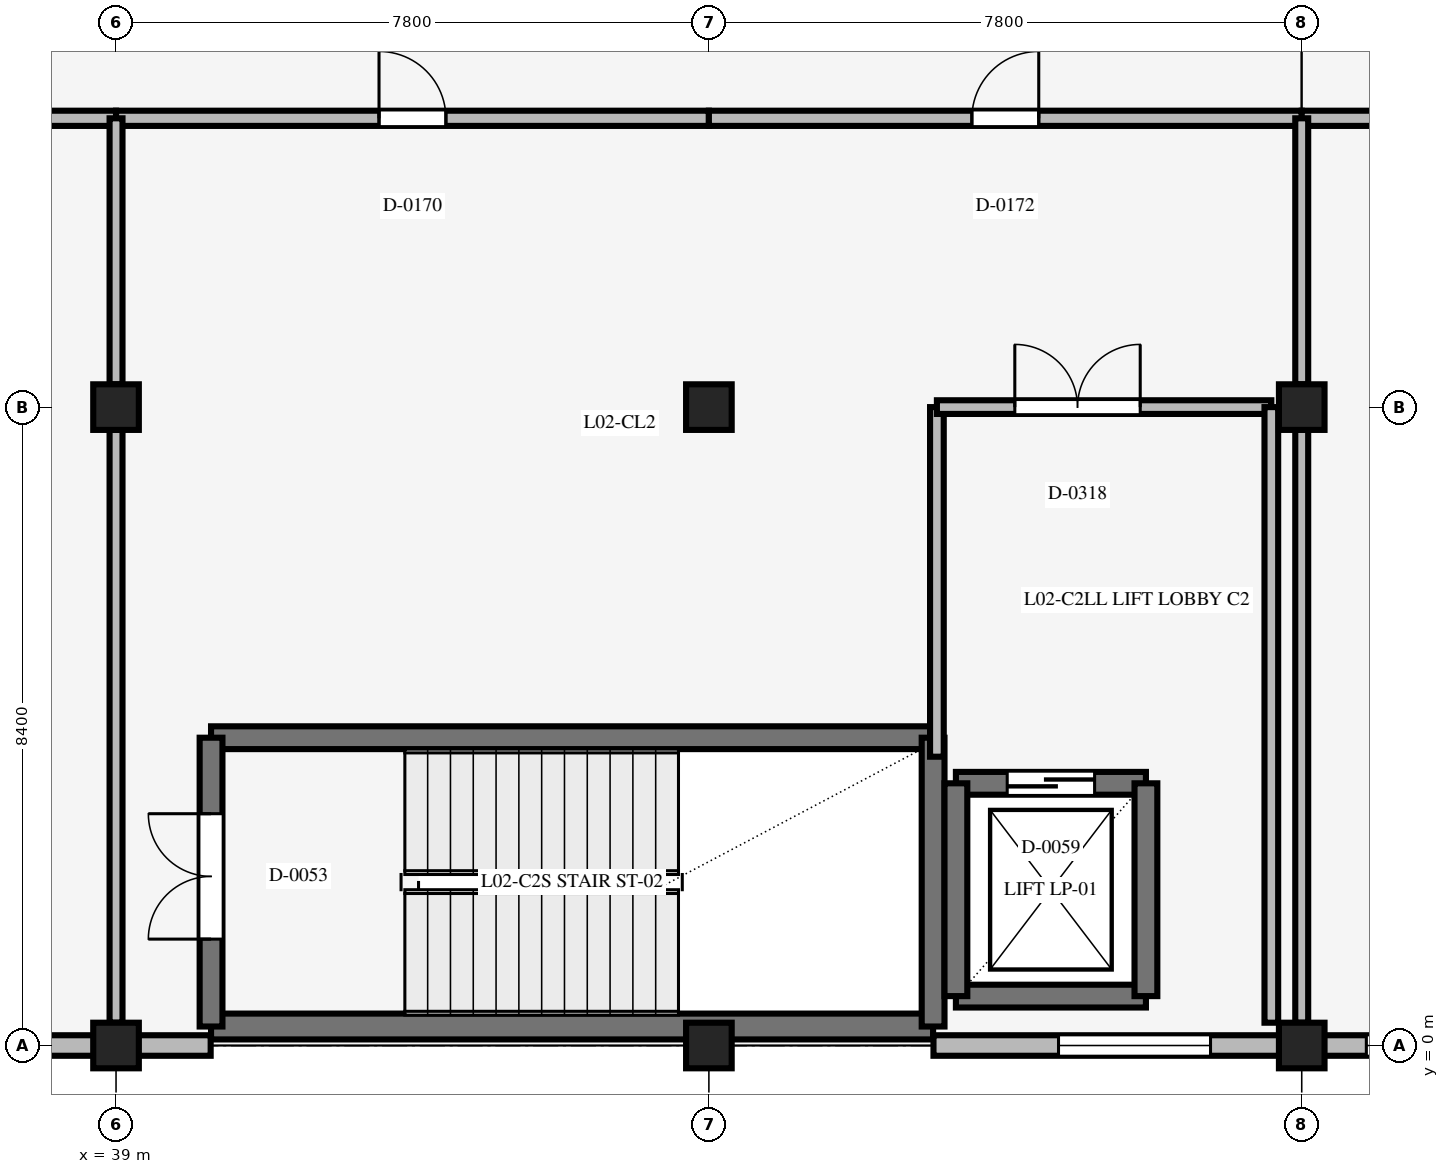
"""IFC4 building model, lengths in metres.
Left out: names, types, materials, properties, quantities, classifications, styles, units other than length and angle.
Written with IfcOpenShell. Run it as: python <this file> out.ifc"""

import sys

from ifc_helpers import new_model, si_unit, direction, frame, frame_2d, origin, origin_2d, place, context, subcontext, project, spatial, rectangle, extrude, element, fill, save


model = new_model("IFC4")
c1 = context("Model", 3, precision=1e-05, world=origin(), true_north=direction((0.0, 1.0)))
c2 = subcontext(c1, "Body", "Model", "MODEL_VIEW")
j1 = project(units=[si_unit("LENGTHUNIT", "METRE"), si_unit("PLANEANGLEUNIT", "RADIAN")], contexts=[c1])
p1 = place(None, origin())
s1 = spatial("IfcSite", under=j1, at=p1, CompositionType="ELEMENT")
p2 = place(p1, origin())
s2 = spatial("IfcBuilding", under=s1, at=p2, CompositionType="ELEMENT")
p3 = place(p2, frame((0.0, 0.0, 12.0)))
s3 = spatial("IfcBuildingStorey", under=s2, at=p3, CompositionType="ELEMENT", Elevation=12.0)
for number, where, z_axis, x_axis in (
    (1, (39.0, 0.0, 0.0), (0.0, 0.0, 1.0), (1.0, 0.0, 0.0)),
    (2, (39.0, 8.4, 0.0), (0.0, 0.0, 1.0), (1.0, 0.0, 0.0)),
    (3, (46.8, 0.0, 0.0), (0.0, 0.0, 1.0), (1.0, 0.0, 0.0)),
    (4, (46.8, 8.4, 0.0), (0.0, 0.0, 1.0), (1.0, 0.0, 0.0)),
    (5, (54.6, 0.0, 0.0), (0.0, 0.0, 1.0), (1.0, 0.0, 0.0)),
    (6, (54.6, 8.4, 0.0), (0.0, 0.0, 1.0), (1.0, 0.0, 0.0)),
):
    element("IfcColumn", number, at=place(p3, frame(where, z_axis=z_axis, x_axis=x_axis)), inside=s3, PredefinedType="COLUMN", context=c2, shape_type="SweptSolid", body=[
        extrude(rectangle(XDim=0.6, YDim=0.6, at=origin_2d()), origin(), (0.0, 0.0, 1.0), 3.9),
    ])
p4 = place(p3, frame((49.75, 0.25, 0.0), z_axis=(0.0, 0.0, 1.0), x_axis=(-1.0, 0.0, 0.0)))
e7 = element("IfcWall", 7, at=p4, inside=s3, PredefinedType="STANDARD", context=c2, shape_type="SweptSolid", body=[
    extrude(rectangle(XDim=9.5, YDim=0.34, at=frame_2d((4.75, 0.0))), origin(), (0.0, 0.0, 1.0), 3.9),
])
p5 = place(p3, frame((40.25, 4.05, 0.0), z_axis=(0.0, 0.0, 1.0), x_axis=(1.0, 0.0, 0.0)))
e8 = element("IfcWall", 8, at=p5, inside=s3, PredefinedType="SHEAR", context=c2, shape_type="SweptSolid", body=[
    extrude(rectangle(XDim=9.5, YDim=0.3, at=frame_2d((4.75, 0.0))), origin(), (0.0, 0.0, 1.0), 3.9),
])
p6 = place(p3, frame((40.25, 0.25, 0.0), z_axis=(0.0, 0.0, 1.0), x_axis=(0.0, 1.0, 0.0)))
e9 = element("IfcWall", 9, at=p6, inside=s3, PredefinedType="SHEAR", context=c2, shape_type="SweptSolid", body=[
    extrude(rectangle(XDim=3.8, YDim=0.3, at=frame_2d((1.9, 0.0))), origin(), (0.0, 0.0, 1.0), 3.9),
])
p7 = place(p6, frame((1.15, 0.0, 0.0)))
e10 = element("IfcOpeningElement", 10, at=p7, cuts=e9, PredefinedType="OPENING", context=c2, shape_type="SweptSolid", body=[
    extrude(rectangle(XDim=1.65, YDim=2.2, at=frame_2d((0.825, 1.1))), frame((0.0, 0.16, 0.0), z_axis=(0.0, -1.0, 0.0), x_axis=(1.0, 0.0, 0.0)), (0.0, 0.0, 1.0), 0.32),
])
p8 = place(p3, frame((49.75, 0.25, 0.0), z_axis=(0.0, 0.0, 1.0), x_axis=(0.0, 1.0, 0.0)))
e11 = element("IfcWall", 11, at=p8, inside=s3, PredefinedType="SHEAR", context=c2, shape_type="SweptSolid", body=[
    extrude(rectangle(XDim=3.8, YDim=0.3, at=frame_2d((1.9, 0.0))), origin(), (0.0, 0.0, 1.0), 3.9),
])
p9 = place(p3, frame((50.05, 0.65, 0.0), z_axis=(0.0, 0.0, 1.0), x_axis=(1.0, 0.0, 0.0)))
e12 = element("IfcWall", 12, at=p9, inside=s3, PredefinedType="SHEAR", context=c2, shape_type="SweptSolid", body=[
    extrude(rectangle(XDim=2.5, YDim=0.3, at=frame_2d((1.25, 0.0))), origin(), (0.0, 0.0, 1.0), 3.64),
])
p10 = place(p3, frame((50.05, 3.45, 0.0), z_axis=(0.0, 0.0, 1.0), x_axis=(1.0, 0.0, 0.0)))
e13 = element("IfcWall", 13, at=p10, inside=s3, PredefinedType="SHEAR", context=c2, shape_type="SweptSolid", body=[
    extrude(rectangle(XDim=2.5, YDim=0.3, at=frame_2d((1.25, 0.0))), origin(), (0.0, 0.0, 1.0), 3.64),
])
p11 = place(p10, frame((0.675, 0.0, 0.0)))
e14 = element("IfcOpeningElement", 14, at=p11, cuts=e13, PredefinedType="OPENING", context=c2, shape_type="SweptSolid", body=[
    extrude(rectangle(XDim=1.15, YDim=2.2, at=frame_2d((0.575, 1.1))), frame((0.0, 0.16, 0.0), z_axis=(0.0, -1.0, 0.0), x_axis=(1.0, 0.0, 0.0)), (0.0, 0.0, 1.0), 0.32),
])
for number, where, z_axis, x_axis in (
    (15, (50.05, 0.65, 0.0), (0.0, 0.0, 1.0), (0.0, 1.0, 0.0)),
    (16, (52.55, 0.65, 0.0), (0.0, 0.0, 1.0), (0.0, 1.0, 0.0)),
):
    element("IfcWall", number, at=place(p3, frame(where, z_axis=z_axis, x_axis=x_axis)), inside=s3, PredefinedType="SHEAR", context=c2, shape_type="SweptSolid", body=[
        extrude(rectangle(XDim=2.8, YDim=0.3, at=frame_2d((1.4, 0.0))), origin(), (0.0, 0.0, 1.0), 3.64),
    ])
p12 = place(p3, frame((38.71, 0.0, 0.0), z_axis=(0.0, 0.0, 1.0), x_axis=(-1.0, 0.0, 0.0)))
e17 = element("IfcWall", 17, at=p12, inside=s3, PredefinedType="STANDARD", context=c2, shape_type="SweptSolid", body=[
    extrude(rectangle(XDim=7.22, YDim=0.27, at=frame_2d((3.61, 0.0))), origin(), (0.0, 0.0, 1.0), 3.271),
])
p13 = place(p12, frame((0.96, 0.0, 0.9)))
e18 = element("IfcOpeningElement", 18, at=p13, cuts=e17, PredefinedType="OPENING", context=c2, shape_type="SweptSolid", body=[
    extrude(rectangle(XDim=3.2, YDim=2.1, at=frame_2d((1.6, 1.05))), frame((0.0, 0.145, 0.0), z_axis=(0.0, -1.0, 0.0), x_axis=(1.0, 0.0, 0.0)), (0.0, 0.0, 1.0), 0.29),
])
p14 = place(p3, frame((40.245, 0.0, 0.0), z_axis=(0.0, 0.0, 1.0), x_axis=(-1.0, 0.0, 0.0)))
e19 = element("IfcWall", 19, at=p14, inside=s3, PredefinedType="STANDARD", context=c2, shape_type="SweptSolid", body=[
    extrude(rectangle(XDim=0.955, YDim=0.27, at=frame_2d((0.478, 0.0))), origin(), (0.0, 0.0, 1.0), 3.64),
])
p15 = place(p3, frame((54.31, 0.0, 0.0), z_axis=(0.0, 0.0, 1.0), x_axis=(-1.0, 0.0, 0.0)))
e20 = element("IfcWall", 20, at=p15, inside=s3, PredefinedType="STANDARD", context=c2, shape_type="SweptSolid", body=[
    extrude(rectangle(XDim=4.555, YDim=0.27, at=frame_2d((2.278, 0.0))), origin(), (0.0, 0.0, 1.0), 3.64),
])
p16 = place(p15, frame((0.91, 0.0, 1.2)))
e21 = element("IfcOpeningElement", 21, at=p16, cuts=e20, PredefinedType="OPENING", context=c2, shape_type="SweptSolid", body=[
    extrude(rectangle(XDim=2.0, YDim=0.9, at=frame_2d((1.0, 0.45))), frame((0.0, 0.145, 0.0), z_axis=(0.0, -1.0, 0.0), x_axis=(1.0, 0.0, 0.0)), (0.0, 0.0, 1.0), 0.29),
])
p17 = place(p3, frame((57.445, 0.0, 0.0), z_axis=(0.0, 0.0, 1.0), x_axis=(-1.0, 0.0, 0.0)))
e22 = element("IfcWall", 22, at=p17, inside=s3, PredefinedType="STANDARD", context=c2, shape_type="SweptSolid", body=[
    extrude(rectangle(XDim=2.555, YDim=0.27, at=frame_2d((1.278, 0.0))), origin(), (0.0, 0.0, 1.0), 3.64),
])
p18 = place(p17, frame((0.495, 0.0, 0.95)))
e23 = element("IfcOpeningElement", 23, at=p18, cuts=e22, PredefinedType="OPENING", context=c2, shape_type="SweptSolid", body=[
    extrude(rectangle(XDim=1.5, YDim=1.6, at=frame_2d((0.75, 0.8))), frame((0.0, 0.145, 0.0), z_axis=(0.0, -1.0, 0.0), x_axis=(1.0, 0.0, 0.0)), (0.0, 0.0, 1.0), 0.29),
])
p19 = place(p3, frame((31.2, 12.2, 0.0), z_axis=(0.0, 0.0, 1.0), x_axis=(1.0, 0.0, 0.0)))
e24 = element("IfcWall", 24, at=p19, inside=s3, PredefinedType="STANDARD", context=c2, shape_type="SweptSolid", body=[
    extrude(rectangle(XDim=7.8, YDim=0.2, at=frame_2d((3.9, 0.0))), origin(), (0.0, 0.0, 1.0), 3.05),
])
p20 = place(p19, frame((3.46, 0.0, 0.0)))
e25 = element("IfcOpeningElement", 25, at=p20, cuts=e24, PredefinedType="OPENING", context=c2, shape_type="SweptSolid", body=[
    extrude(rectangle(XDim=0.88, YDim=2.1, at=frame_2d((0.44, 1.05))), frame((0.0, 0.11, 0.0), z_axis=(0.0, -1.0, 0.0), x_axis=(1.0, 0.0, 0.0)), (0.0, 0.0, 1.0), 0.22),
])
p21 = place(p3, frame((39.0, 12.2, 0.0), z_axis=(0.0, 0.0, 1.0), x_axis=(1.0, 0.0, 0.0)))
e26 = element("IfcWall", 26, at=p21, inside=s3, PredefinedType="STANDARD", context=c2, shape_type="SweptSolid", body=[
    extrude(rectangle(XDim=7.8, YDim=0.2, at=frame_2d((3.9, 0.0))), origin(), (0.0, 0.0, 1.0), 3.05),
])
p22 = place(p21, frame((3.46, 0.0, 0.0)))
e27 = element("IfcOpeningElement", 27, at=p22, cuts=e26, PredefinedType="OPENING", context=c2, shape_type="SweptSolid", body=[
    extrude(rectangle(XDim=0.88, YDim=2.1, at=frame_2d((0.44, 1.05))), frame((0.0, 0.11, 0.0), z_axis=(0.0, -1.0, 0.0), x_axis=(1.0, 0.0, 0.0)), (0.0, 0.0, 1.0), 0.22),
])
p23 = place(p3, frame((46.8, 12.2, 0.0), z_axis=(0.0, 0.0, 1.0), x_axis=(1.0, 0.0, 0.0)))
e28 = element("IfcWall", 28, at=p23, inside=s3, PredefinedType="STANDARD", context=c2, shape_type="SweptSolid", body=[
    extrude(rectangle(XDim=7.8, YDim=0.2, at=frame_2d((3.9, 0.0))), origin(), (0.0, 0.0, 1.0), 3.05),
])
p24 = place(p23, frame((3.46, 0.0, 0.0)))
e29 = element("IfcOpeningElement", 29, at=p24, cuts=e28, PredefinedType="OPENING", context=c2, shape_type="SweptSolid", body=[
    extrude(rectangle(XDim=0.88, YDim=2.1, at=frame_2d((0.44, 1.05))), frame((0.0, 0.11, 0.0), z_axis=(0.0, -1.0, 0.0), x_axis=(1.0, 0.0, 0.0)), (0.0, 0.0, 1.0), 0.22),
])
p25 = place(p3, frame((54.6, 12.2, 0.0), z_axis=(0.0, 0.0, 1.0), x_axis=(1.0, 0.0, 0.0)))
e30 = element("IfcWall", 30, at=p25, inside=s3, PredefinedType="STANDARD", context=c2, shape_type="SweptSolid", body=[
    extrude(rectangle(XDim=8.4, YDim=0.2, at=frame_2d((4.2, 0.0))), origin(), (0.0, 0.0, 1.0), 3.05),
])
p26 = place(p25, frame((3.76, 0.0, 0.0)))
e31 = element("IfcOpeningElement", 31, at=p26, cuts=e30, PredefinedType="OPENING", context=c2, shape_type="SweptSolid", body=[
    extrude(rectangle(XDim=0.88, YDim=2.1, at=frame_2d((0.44, 1.05))), frame((0.0, 0.11, 0.0), z_axis=(0.0, -1.0, 0.0), x_axis=(1.0, 0.0, 0.0)), (0.0, 0.0, 1.0), 0.22),
])
p27 = place(p3, frame((39.0, 0.3, 0.0), z_axis=(0.0, 0.0, 1.0), x_axis=(0.0, 1.0, 0.0)))
e32 = element("IfcWall", 32, at=p27, inside=s3, PredefinedType="STANDARD", context=c2, shape_type="SweptSolid", body=[
    extrude(rectangle(XDim=7.8, YDim=0.17, at=frame_2d((3.9, 0.0))), origin(), (0.0, 0.0, 1.0), 2.971),
])
p28 = place(p3, frame((39.0, 8.7, 0.0), z_axis=(0.0, 0.0, 1.0), x_axis=(0.0, 1.0, 0.0)))
e33 = element("IfcWall", 33, at=p28, inside=s3, PredefinedType="STANDARD", context=c2, shape_type="SweptSolid", body=[
    extrude(rectangle(XDim=3.5, YDim=0.17, at=frame_2d((1.75, 0.0))), origin(), (0.0, 0.0, 1.0), 2.971),
])
p29 = place(p3, frame((54.6, 0.3, 0.0), z_axis=(0.0, 0.0, 1.0), x_axis=(0.0, 1.0, 0.0)))
e34 = element("IfcWall", 34, at=p29, inside=s3, PredefinedType="STANDARD", context=c2, shape_type="SweptSolid", body=[
    extrude(rectangle(XDim=7.8, YDim=0.17, at=frame_2d((3.9, 0.0))), origin(), (0.0, 0.0, 1.0), 2.971),
])
p30 = place(p3, frame((54.6, 8.7, 0.0), z_axis=(0.0, 0.0, 1.0), x_axis=(0.0, 1.0, 0.0)))
e35 = element("IfcWall", 35, at=p30, inside=s3, PredefinedType="STANDARD", context=c2, shape_type="SweptSolid", body=[
    extrude(rectangle(XDim=3.5, YDim=0.17, at=frame_2d((1.75, 0.0))), origin(), (0.0, 0.0, 1.0), 2.971),
])
p31 = place(p3, frame((49.8, 3.8, 0.0), z_axis=(0.0, 0.0, 1.0), x_axis=(0.0, 1.0, 0.0)))
e36 = element("IfcWall", 36, at=p31, inside=s3, PredefinedType="STANDARD", context=c2, shape_type="SweptSolid", body=[
    extrude(rectangle(XDim=4.6, YDim=0.18, at=frame_2d((2.3, 0.0))), origin(), (0.0, 0.0, 1.0), 3.05),
])
p32 = place(p3, frame((49.8, 8.4, 0.0), z_axis=(0.0, 0.0, 1.0), x_axis=(1.0, 0.0, 0.0)))
e37 = element("IfcWall", 37, at=p32, inside=s3, PredefinedType="STANDARD", context=c2, shape_type="SweptSolid", body=[
    extrude(rectangle(XDim=4.4, YDim=0.18, at=frame_2d((2.2, 0.0))), origin(), (0.0, 0.0, 1.0), 2.971),
])
p33 = place(p32, frame((1.025, 0.0, 0.0)))
e38 = element("IfcOpeningElement", 38, at=p33, cuts=e37, PredefinedType="OPENING", context=c2, shape_type="SweptSolid", body=[
    extrude(rectangle(XDim=1.65, YDim=2.2, at=frame_2d((0.825, 1.1))), frame((0.0, 0.1, 0.0), z_axis=(0.0, -1.0, 0.0), x_axis=(1.0, 0.0, 0.0)), (0.0, 0.0, 1.0), 0.2),
])
p34 = place(p3, frame((54.2, 0.3, 0.0), z_axis=(0.0, 0.0, 1.0), x_axis=(0.0, 1.0, 0.0)))
e39 = element("IfcWall", 39, at=p34, inside=s3, PredefinedType="STANDARD", context=c2, shape_type="SweptSolid", body=[
    extrude(rectangle(XDim=8.1, YDim=0.18, at=frame_2d((4.05, 0.0))), origin(), (0.0, 0.0, 1.0), 3.05),
])
p35 = place(p16, origin())
e40 = element("IfcWindow", 40, at=p35, inside=s3, PartitioningType="SINGLE_PANEL", PredefinedType="WINDOW", context=c2, shape_type="SweptSolid", body=[
    extrude(rectangle(XDim=2.0, YDim=0.9, at=frame_2d((1.0, 0.45))), frame((0.0, 0.03, 0.0), z_axis=(0.0, -1.0, 0.0), x_axis=(1.0, 0.0, 0.0)), (0.0, 0.0, 1.0), 0.06),
])
fill(e21, e40)
p36 = place(p18, origin())
e41 = element("IfcWindow", 41, at=p36, inside=s3, PartitioningType="SINGLE_PANEL", PredefinedType="WINDOW", context=c2, shape_type="SweptSolid", body=[
    extrude(rectangle(XDim=1.5, YDim=1.6, at=frame_2d((0.75, 0.8))), frame((0.0, 0.03, 0.0), z_axis=(0.0, -1.0, 0.0), x_axis=(1.0, 0.0, 0.0)), (0.0, 0.0, 1.0), 0.06),
])
fill(e23, e41)
p37 = place(p7, origin())
e42 = element("IfcDoor", 42, at=p37, inside=s3, OperationType="DOUBLE_DOOR_SINGLE_SWING", PredefinedType="DOOR", context=c2, shape_type="SweptSolid", body=[
    extrude(rectangle(XDim=1.65, YDim=2.2, at=frame_2d((0.825, 1.1))), frame((0.0, 0.025, 0.0), z_axis=(0.0, -1.0, 0.0), x_axis=(1.0, 0.0, 0.0)), (0.0, 0.0, 1.0), 0.05),
])
fill(e10, e42)
p38 = place(p11, origin())
e43 = element("IfcDoor", 43, at=p38, inside=s3, OperationType="DOUBLE_DOOR_SLIDING", PredefinedType="DOOR", context=c2, shape_type="SweptSolid", body=[
    extrude(rectangle(XDim=1.15, YDim=2.2, at=frame_2d((0.575, 1.1))), frame((0.0, 0.025, 0.0), z_axis=(0.0, -1.0, 0.0), x_axis=(1.0, 0.0, 0.0)), (0.0, 0.0, 1.0), 0.05),
])
fill(e14, e43)
p39 = place(p22, origin())
e44 = element("IfcDoor", 44, at=p39, inside=s3, OperationType="SINGLE_SWING_LEFT", PredefinedType="DOOR", context=c2, shape_type="SweptSolid", body=[
    extrude(rectangle(XDim=0.88, YDim=2.1, at=frame_2d((0.44, 1.05))), frame((0.0, 0.025, 0.0), z_axis=(0.0, -1.0, 0.0), x_axis=(1.0, 0.0, 0.0)), (0.0, 0.0, 1.0), 0.05),
])
fill(e27, e44)
p40 = place(p24, origin())
e45 = element("IfcDoor", 45, at=p40, inside=s3, OperationType="SINGLE_SWING_RIGHT", PredefinedType="DOOR", context=c2, shape_type="SweptSolid", body=[
    extrude(rectangle(XDim=0.88, YDim=2.1, at=frame_2d((0.44, 1.05))), frame((0.0, 0.025, 0.0), z_axis=(0.0, -1.0, 0.0), x_axis=(1.0, 0.0, 0.0)), (0.0, 0.0, 1.0), 0.05),
])
fill(e29, e45)
p41 = place(p33, origin())
e46 = element("IfcDoor", 46, at=p41, inside=s3, OperationType="DOUBLE_DOOR_SINGLE_SWING", PredefinedType="DOOR", context=c2, shape_type="SweptSolid", body=[
    extrude(rectangle(XDim=1.65, YDim=2.2, at=frame_2d((0.825, 1.1))), frame((0.0, 0.025, 0.0), z_axis=(0.0, -1.0, 0.0), x_axis=(1.0, 0.0, 0.0)), (0.0, 0.0, 1.0), 0.05),
])
fill(e38, e46)
save(model, sys.argv[1])
